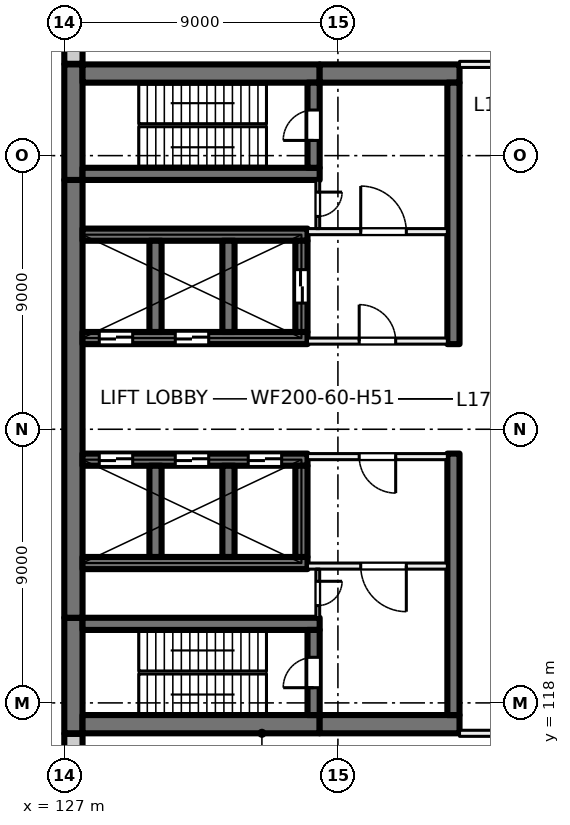
"""IFC4 building model, lengths in metres.
Left out: names, types, materials, properties, quantities, classifications, styles, units other than length and angle.
Written with IfcOpenShell. Run it as: python <this file> out.ifc"""

import sys

from ifc_helpers import new_model, si_unit, direction, frame, frame_2d, origin, place, context, subcontext, project, spatial, rectangle, extrude, element, fill, save


model = new_model("IFC4")
c1 = context("Model", 3, precision=1e-05, world=origin(), true_north=direction((0.0, 1.0)))
c2 = subcontext(c1, "Body", "Model", "MODEL_VIEW")
j1 = project(units=[si_unit("LENGTHUNIT", "METRE"), si_unit("PLANEANGLEUNIT", "RADIAN")], contexts=[c1])
p1 = place(None, origin())
s1 = spatial("IfcSite", under=j1, at=p1, CompositionType="ELEMENT")
p2 = place(p1, origin())
s2 = spatial("IfcBuilding", under=s1, at=p2, CompositionType="ELEMENT")
p3 = place(p2, frame((0.0, 0.0, 75.5)))
s3 = spatial("IfcBuildingStorey", under=s2, at=p3, CompositionType="ELEMENT", Elevation=75.5)
p4 = place(p3, frame((127.3, 117.0, 0.0), z_axis=(0.0, 0.0, 1.0), x_axis=(0.0, 1.0, 0.0)))
e1 = element("IfcWall", 1, at=p4, inside=s3, PredefinedType="SHEAR", context=c2, shape_type="SweptSolid", body=[
    extrude(rectangle(XDim=3.8, YDim=0.6, at=frame_2d((1.9, 0.0))), origin(), (0.0, 0.0, 1.0), 5.5),
])
p5 = place(p3, frame((127.3, 120.8, 0.0), z_axis=(0.0, 0.0, 1.0), x_axis=(0.0, 1.0, 0.0)))
e2 = element("IfcWall", 2, at=p5, inside=s3, PredefinedType="SHEAR", context=c2, shape_type="SweptSolid", body=[
    extrude(rectangle(XDim=14.4, YDim=0.6, at=frame_2d((7.2, 0.0))), origin(), (0.0, 0.0, 1.0), 5.5),
])
p6 = place(p3, frame((127.3, 135.2, 0.0), z_axis=(0.0, 0.0, 1.0), x_axis=(0.0, 1.0, 0.0)))
e3 = element("IfcWall", 3, at=p6, inside=s3, PredefinedType="SHEAR", context=c2, shape_type="SweptSolid", body=[
    extrude(rectangle(XDim=3.8, YDim=0.6, at=frame_2d((1.9, 0.0))), origin(), (0.0, 0.0, 1.0), 5.5),
])
for number, where, z_axis, x_axis in (
    (4, (127.6, 117.3, 0.0), (0.0, 0.0, 1.0), (1.0, 0.0, 0.0)),
    (5, (127.6, 138.7, 0.0), (0.0, 0.0, 1.0), (1.0, 0.0, 0.0)),
):
    element("IfcWall", number, at=place(p3, frame(where, z_axis=z_axis, x_axis=x_axis)), inside=s3, PredefinedType="SHEAR", context=c2, shape_type="SweptSolid", body=[
        extrude(rectangle(XDim=7.8, YDim=0.6, at=frame_2d((3.9, 0.0))), origin(), (0.0, 0.0, 1.0), 5.5),
    ])
for number, where, z_axis, x_axis in (
    (6, (135.4, 117.3, 0.0), (0.0, 0.0, 1.0), (1.0, 0.0, 0.0)),
    (7, (135.4, 138.7, 0.0), (0.0, 0.0, 1.0), (1.0, 0.0, 0.0)),
):
    element("IfcWall", number, at=place(p3, frame(where, z_axis=z_axis, x_axis=x_axis)), inside=s3, PredefinedType="SHEAR", context=c2, shape_type="SweptSolid", body=[
        extrude(rectangle(XDim=4.6, YDim=0.6, at=frame_2d((2.3, 0.0))), origin(), (0.0, 0.0, 1.0), 5.5),
    ])
p7 = place(p3, frame((127.6, 120.6, 0.0), z_axis=(0.0, 0.0, 1.0), x_axis=(1.0, 0.0, 0.0)))
e8 = element("IfcWall", 8, at=p7, inside=s3, PredefinedType="SHEAR", context=c2, shape_type="SweptSolid", body=[
    extrude(rectangle(XDim=7.8, YDim=0.4, at=frame_2d((3.9, 0.0))), origin(), (0.0, 0.0, 1.0), 5.5),
])
p8 = place(p3, frame((135.2, 117.6, 0.0), z_axis=(0.0, 0.0, 1.0), x_axis=(0.0, 1.0, 0.0)))
e9 = element("IfcWall", 9, at=p8, inside=s3, PredefinedType="SHEAR", context=c2, shape_type="SweptSolid", body=[
    extrude(rectangle(XDim=2.8, YDim=0.4, at=frame_2d((1.4, 0.0))), origin(), (0.0, 0.0, 1.0), 5.5),
])
p9 = place(p8, frame((0.9, 0.0, 0.0)))
e10 = element("IfcOpeningElement", 10, at=p9, cuts=e9, PredefinedType="OPENING", context=c2, shape_type="SweptSolid", body=[
    extrude(rectangle(XDim=1.0, YDim=2.1, at=frame_2d((0.5, 1.05))), frame((0.0, 0.21, 0.0), z_axis=(0.0, -1.0, 0.0), x_axis=(1.0, 0.0, 0.0)), (0.0, 0.0, 1.0), 0.42),
])
p10 = place(p3, frame((127.6, 135.4, 0.0), z_axis=(0.0, 0.0, 1.0), x_axis=(1.0, 0.0, 0.0)))
e11 = element("IfcWall", 11, at=p10, inside=s3, PredefinedType="SHEAR", context=c2, shape_type="SweptSolid", body=[
    extrude(rectangle(XDim=7.8, YDim=0.4, at=frame_2d((3.9, 0.0))), origin(), (0.0, 0.0, 1.0), 5.5),
])
p11 = place(p3, frame((135.2, 135.6, 0.0), z_axis=(0.0, 0.0, 1.0), x_axis=(0.0, 1.0, 0.0)))
e12 = element("IfcWall", 12, at=p11, inside=s3, PredefinedType="SHEAR", context=c2, shape_type="SweptSolid", body=[
    extrude(rectangle(XDim=2.8, YDim=0.4, at=frame_2d((1.4, 0.0))), origin(), (0.0, 0.0, 1.0), 5.5),
])
p12 = place(p11, frame((0.9, 0.0, 0.0)))
e13 = element("IfcOpeningElement", 13, at=p12, cuts=e12, PredefinedType="OPENING", context=c2, shape_type="SweptSolid", body=[
    extrude(rectangle(XDim=1.0, YDim=2.1, at=frame_2d((0.5, 1.05))), frame((0.0, 0.21, 0.0), z_axis=(0.0, -1.0, 0.0), x_axis=(1.0, 0.0, 0.0)), (0.0, 0.0, 1.0), 0.42),
])
p13 = place(p3, frame((127.6, 126.0, 0.0), z_axis=(0.0, 0.0, 1.0), x_axis=(1.0, 0.0, 0.0)))
e14 = element("IfcWall", 14, at=p13, inside=s3, PredefinedType="SHEAR", context=c2, shape_type="SweptSolid", body=[
    extrude(rectangle(XDim=7.4, YDim=0.4, at=frame_2d((3.7, 0.0))), origin(), (0.0, 0.0, 1.0), 5.5),
])
p14 = place(p13, frame((0.55, 0.0, 0.0)))
e15 = element("IfcOpeningElement", 15, at=p14, cuts=e14, PredefinedType="OPENING", context=c2, shape_type="SweptSolid", body=[
    extrude(rectangle(XDim=1.1, YDim=2.1, at=frame_2d((0.55, 1.05))), frame((0.0, 0.21, 0.0), z_axis=(0.0, -1.0, 0.0), x_axis=(1.0, 0.0, 0.0)), (0.0, 0.0, 1.0), 0.42),
])
p15 = place(p13, frame((3.05, 0.0, 0.0)))
e16 = element("IfcOpeningElement", 16, at=p15, cuts=e14, PredefinedType="OPENING", context=c2, shape_type="SweptSolid", body=[
    extrude(rectangle(XDim=1.1, YDim=2.1, at=frame_2d((0.55, 1.05))), frame((0.0, 0.21, 0.0), z_axis=(0.0, -1.0, 0.0), x_axis=(1.0, 0.0, 0.0)), (0.0, 0.0, 1.0), 0.42),
])
p16 = place(p13, frame((5.45, 0.0, 0.0)))
e17 = element("IfcOpeningElement", 17, at=p16, cuts=e14, PredefinedType="OPENING", context=c2, shape_type="SweptSolid", body=[
    extrude(rectangle(XDim=1.1, YDim=2.1, at=frame_2d((0.55, 1.05))), frame((0.0, 0.21, 0.0), z_axis=(0.0, -1.0, 0.0), x_axis=(1.0, 0.0, 0.0)), (0.0, 0.0, 1.0), 0.42),
])
p17 = place(p3, frame((127.6, 122.6, 0.0), z_axis=(0.0, 0.0, 1.0), x_axis=(1.0, 0.0, 0.0)))
e18 = element("IfcWall", 18, at=p17, inside=s3, PredefinedType="SHEAR", context=c2, shape_type="SweptSolid", body=[
    extrude(rectangle(XDim=7.4, YDim=0.4, at=frame_2d((3.7, 0.0))), origin(), (0.0, 0.0, 1.0), 5.5),
])
for number, where, z_axis, x_axis in (
    (19, (130.0, 122.8, 0.0), (0.0, 0.0, 1.0), (0.0, 1.0, 0.0)),
    (20, (132.4, 122.8, 0.0), (0.0, 0.0, 1.0), (0.0, 1.0, 0.0)),
    (21, (134.8, 122.8, 0.0), (0.0, 0.0, 1.0), (0.0, 1.0, 0.0)),
):
    element("IfcWall", number, at=place(p3, frame(where, z_axis=z_axis, x_axis=x_axis)), inside=s3, PredefinedType="SHEAR", context=c2, shape_type="SweptSolid", body=[
        extrude(rectangle(XDim=3.0, YDim=0.4, at=frame_2d((1.5, 0.0))), origin(), (0.0, 0.0, 1.0), 5.5),
    ])
p18 = place(p3, frame((127.6, 130.0, 0.0), z_axis=(0.0, 0.0, 1.0), x_axis=(1.0, 0.0, 0.0)))
e22 = element("IfcWall", 22, at=p18, inside=s3, PredefinedType="SHEAR", context=c2, shape_type="SweptSolid", body=[
    extrude(rectangle(XDim=7.4, YDim=0.4, at=frame_2d((3.7, 0.0))), origin(), (0.0, 0.0, 1.0), 5.5),
])
p19 = place(p18, frame((0.55, 0.0, 0.0)))
e23 = element("IfcOpeningElement", 23, at=p19, cuts=e22, PredefinedType="OPENING", context=c2, shape_type="SweptSolid", body=[
    extrude(rectangle(XDim=1.1, YDim=2.1, at=frame_2d((0.55, 1.05))), frame((0.0, 0.21, 0.0), z_axis=(0.0, -1.0, 0.0), x_axis=(1.0, 0.0, 0.0)), (0.0, 0.0, 1.0), 0.42),
])
p20 = place(p18, frame((3.05, 0.0, 0.0)))
e24 = element("IfcOpeningElement", 24, at=p20, cuts=e22, PredefinedType="OPENING", context=c2, shape_type="SweptSolid", body=[
    extrude(rectangle(XDim=1.1, YDim=2.1, at=frame_2d((0.55, 1.05))), frame((0.0, 0.21, 0.0), z_axis=(0.0, -1.0, 0.0), x_axis=(1.0, 0.0, 0.0)), (0.0, 0.0, 1.0), 0.42),
])
p21 = place(p3, frame((127.6, 133.4, 0.0), z_axis=(0.0, 0.0, 1.0), x_axis=(1.0, 0.0, 0.0)))
e25 = element("IfcWall", 25, at=p21, inside=s3, PredefinedType="SHEAR", context=c2, shape_type="SweptSolid", body=[
    extrude(rectangle(XDim=7.4, YDim=0.4, at=frame_2d((3.7, 0.0))), origin(), (0.0, 0.0, 1.0), 5.5),
])
for number, where, z_axis, x_axis in (
    (26, (130.0, 130.2, 0.0), (0.0, 0.0, 1.0), (0.0, 1.0, 0.0)),
    (27, (132.4, 130.2, 0.0), (0.0, 0.0, 1.0), (0.0, 1.0, 0.0)),
):
    element("IfcWall", number, at=place(p3, frame(where, z_axis=z_axis, x_axis=x_axis)), inside=s3, PredefinedType="SHEAR", context=c2, shape_type="SweptSolid", body=[
        extrude(rectangle(XDim=3.0, YDim=0.4, at=frame_2d((1.5, 0.0))), origin(), (0.0, 0.0, 1.0), 5.5),
    ])
p22 = place(p3, frame((134.8, 130.2, 0.0), z_axis=(0.0, 0.0, 1.0), x_axis=(0.0, 1.0, 0.0)))
e28 = element("IfcWall", 28, at=p22, inside=s3, PredefinedType="SHEAR", context=c2, shape_type="SweptSolid", body=[
    extrude(rectangle(XDim=3.0, YDim=0.4, at=frame_2d((1.5, 0.0))), origin(), (0.0, 0.0, 1.0), 5.5),
])
p23 = place(p22, frame((0.95, 0.0, 0.0)))
e29 = element("IfcOpeningElement", 29, at=p23, cuts=e28, PredefinedType="OPENING", context=c2, shape_type="SweptSolid", body=[
    extrude(rectangle(XDim=1.1, YDim=2.1, at=frame_2d((0.55, 1.05))), frame((0.0, 0.21, 0.0), z_axis=(0.0, -1.0, 0.0), x_axis=(1.0, 0.0, 0.0)), (0.0, 0.0, 1.0), 0.42),
])
for number, where, z_axis, x_axis in (
    (30, (139.8, 117.6, 0.0), (0.0, 0.0, 1.0), (0.0, 1.0, 0.0)),
    (31, (139.8, 129.8, 0.0), (0.0, 0.0, 1.0), (0.0, 1.0, 0.0)),
):
    element("IfcWall", number, at=place(p3, frame(where, z_axis=z_axis, x_axis=x_axis)), inside=s3, PredefinedType="SHEAR", context=c2, shape_type="SweptSolid", body=[
        extrude(rectangle(XDim=8.6, YDim=0.4, at=frame_2d((4.3, 0.0))), origin(), (0.0, 0.0, 1.0), 5.5),
    ])
p24 = place(p3, frame((127.3, 139.02, 0.0), z_axis=(0.0, 0.0, 1.0), x_axis=(0.0, 1.0, 0.0)))
e32 = element("IfcWall", 32, at=p24, inside=s3, PredefinedType="SOLIDWALL", context=c2, shape_type="SweptSolid", body=[
    extrude(rectangle(XDim=2.98, YDim=0.6, at=frame_2d((1.49, 0.0))), origin(), (0.0, 0.0, 1.0), 5.125),
])
p25 = place(p3, frame((127.3, 114.07, 0.0), z_axis=(0.0, 0.0, 1.0), x_axis=(0.0, 1.0, 0.0)))
e33 = element("IfcWall", 33, at=p25, inside=s3, PredefinedType="SOLIDWALL", context=c2, shape_type="SweptSolid", body=[
    extrude(rectangle(XDim=2.91, YDim=0.6, at=frame_2d((1.455, 0.0))), origin(), (0.0, 0.0, 1.0), 5.125),
])
p26 = place(p3, frame((135.0, 129.9, 0.0), z_axis=(0.0, 0.0, 1.0), x_axis=(1.0, 0.0, 0.0)))
e34 = element("IfcWall", 34, at=p26, inside=s3, PredefinedType="PARTITIONING", context=c2, shape_type="SweptSolid", body=[
    extrude(rectangle(XDim=4.6, YDim=0.2, at=frame_2d((2.3, 0.0))), origin(), (0.0, 0.0, 1.0), 5.125),
])
p27 = place(p26, frame((1.7, 0.0, 0.0)))
e35 = element("IfcOpeningElement", 35, at=p27, cuts=e34, PredefinedType="OPENING", context=c2, shape_type="SweptSolid", body=[
    extrude(rectangle(XDim=1.2, YDim=2.1, at=frame_2d((0.6, 1.05))), frame((0.0, 0.11, 0.0), z_axis=(0.0, -1.0, 0.0), x_axis=(1.0, 0.0, 0.0)), (0.0, 0.0, 1.0), 0.22),
])
p28 = place(p3, frame((135.0, 133.5, 0.0), z_axis=(0.0, 0.0, 1.0), x_axis=(1.0, 0.0, 0.0)))
e36 = element("IfcWall", 36, at=p28, inside=s3, PredefinedType="PARTITIONING", context=c2, shape_type="SweptSolid", body=[
    extrude(rectangle(XDim=4.6, YDim=0.2, at=frame_2d((2.3, 0.0))), origin(), (0.0, 0.0, 1.0), 5.125),
])
p29 = place(p28, frame((1.75, 0.0, 0.0)))
e37 = element("IfcOpeningElement", 37, at=p29, cuts=e36, PredefinedType="OPENING", context=c2, shape_type="SweptSolid", body=[
    extrude(rectangle(XDim=1.5, YDim=2.1, at=frame_2d((0.75, 1.05))), frame((0.0, 0.11, 0.0), z_axis=(0.0, -1.0, 0.0), x_axis=(1.0, 0.0, 0.0)), (0.0, 0.0, 1.0), 0.22),
])
p30 = place(p3, frame((135.337, 135.2, 0.0), z_axis=(0.0, 0.0, 1.0), x_axis=(0.0, -1.0, 0.0)))
e38 = element("IfcWall", 38, at=p30, inside=s3, PredefinedType="PARTITIONING", context=c2, shape_type="SweptSolid", body=[
    extrude(rectangle(XDim=1.6, YDim=0.125, at=frame_2d((0.8, 0.0))), origin(), (0.0, 0.0, 1.0), 5.125),
])
p31 = place(p30, frame((0.4, 0.0, 0.0)))
e39 = element("IfcOpeningElement", 39, at=p31, cuts=e38, PredefinedType="OPENING", context=c2, shape_type="SweptSolid", body=[
    extrude(rectangle(XDim=0.8, YDim=2.1, at=frame_2d((0.4, 1.05))), frame((0.0, 0.073, 0.0), z_axis=(0.0, -1.0, 0.0), x_axis=(1.0, 0.0, 0.0)), (0.0, 0.0, 1.0), 0.145),
])
p32 = place(p3, frame((139.6, 126.1, 0.0), z_axis=(0.0, 0.0, 1.0), x_axis=(-1.0, 0.0, 0.0)))
e40 = element("IfcWall", 40, at=p32, inside=s3, PredefinedType="PARTITIONING", context=c2, shape_type="SweptSolid", body=[
    extrude(rectangle(XDim=4.6, YDim=0.2, at=frame_2d((2.3, 0.0))), origin(), (0.0, 0.0, 1.0), 5.125),
])
p33 = place(p32, frame((1.7, 0.0, 0.0)))
e41 = element("IfcOpeningElement", 41, at=p33, cuts=e40, PredefinedType="OPENING", context=c2, shape_type="SweptSolid", body=[
    extrude(rectangle(XDim=1.2, YDim=2.1, at=frame_2d((0.6, 1.05))), frame((0.0, 0.11, 0.0), z_axis=(0.0, -1.0, 0.0), x_axis=(1.0, 0.0, 0.0)), (0.0, 0.0, 1.0), 0.22),
])
p34 = place(p3, frame((139.6, 122.5, 0.0), z_axis=(0.0, 0.0, 1.0), x_axis=(-1.0, 0.0, 0.0)))
e42 = element("IfcWall", 42, at=p34, inside=s3, PredefinedType="PARTITIONING", context=c2, shape_type="SweptSolid", body=[
    extrude(rectangle(XDim=4.6, YDim=0.2, at=frame_2d((2.3, 0.0))), origin(), (0.0, 0.0, 1.0), 5.125),
])
p35 = place(p34, frame((1.35, 0.0, 0.0)))
e43 = element("IfcOpeningElement", 43, at=p35, cuts=e42, PredefinedType="OPENING", context=c2, shape_type="SweptSolid", body=[
    extrude(rectangle(XDim=1.5, YDim=2.1, at=frame_2d((0.75, 1.05))), frame((0.0, 0.11, 0.0), z_axis=(0.0, -1.0, 0.0), x_axis=(1.0, 0.0, 0.0)), (0.0, 0.0, 1.0), 0.22),
])
p36 = place(p3, frame((135.337, 122.4, 0.0), z_axis=(0.0, 0.0, 1.0), x_axis=(0.0, -1.0, 0.0)))
e44 = element("IfcWall", 44, at=p36, inside=s3, PredefinedType="PARTITIONING", context=c2, shape_type="SweptSolid", body=[
    extrude(rectangle(XDim=1.6, YDim=0.125, at=frame_2d((0.8, 0.0))), origin(), (0.0, 0.0, 1.0), 5.125),
])
p37 = place(p36, frame((0.4, 0.0, 0.0)))
e45 = element("IfcOpeningElement", 45, at=p37, cuts=e44, PredefinedType="OPENING", context=c2, shape_type="SweptSolid", body=[
    extrude(rectangle(XDim=0.8, YDim=2.1, at=frame_2d((0.4, 1.05))), frame((0.0, 0.073, 0.0), z_axis=(0.0, -1.0, 0.0), x_axis=(1.0, 0.0, 0.0)), (0.0, 0.0, 1.0), 0.145),
])
p38 = place(p3, frame((154.0, 117.0, 0.0), z_axis=(0.0, 0.0, 1.0), x_axis=(-1.0, 0.0, 0.0)))
e46 = element("IfcWall", 46, at=p38, inside=s3, PredefinedType="PARTITIONING", context=c2, shape_type="SweptSolid", body=[
    extrude(rectangle(XDim=14.0, YDim=0.2, at=frame_2d((7.0, 0.0))), origin(), (0.0, 0.0, 1.0), 5.125),
])
p39 = place(p38, frame((11.1, 0.0, 0.0)))
e47 = element("IfcOpeningElement", 47, at=p39, cuts=e46, PredefinedType="OPENING", context=c2, shape_type="SweptSolid", body=[
    extrude(rectangle(XDim=1.8, YDim=2.1, at=frame_2d((0.9, 1.05))), frame((0.0, 0.11, 0.0), z_axis=(0.0, -1.0, 0.0), x_axis=(1.0, 0.0, 0.0)), (0.0, 0.0, 1.0), 0.22),
])
p40 = place(p38, frame((1.1, 0.0, 0.0)))
e48 = element("IfcOpeningElement", 48, at=p40, cuts=e46, PredefinedType="OPENING", context=c2, shape_type="SweptSolid", body=[
    extrude(rectangle(XDim=1.8, YDim=2.1, at=frame_2d((0.9, 1.05))), frame((0.0, 0.11, 0.0), z_axis=(0.0, -1.0, 0.0), x_axis=(1.0, 0.0, 0.0)), (0.0, 0.0, 1.0), 0.22),
])
p41 = place(p3, frame((140.0, 139.0, 0.0), z_axis=(0.0, 0.0, 1.0), x_axis=(1.0, 0.0, 0.0)))
e49 = element("IfcWall", 49, at=p41, inside=s3, PredefinedType="PARTITIONING", context=c2, shape_type="SweptSolid", body=[
    extrude(rectangle(XDim=4.0, YDim=0.2, at=frame_2d((2.0, 0.0))), origin(), (0.0, 0.0, 1.0), 5.125),
])
p42 = place(p41, frame((1.1, 0.0, 0.0)))
e50 = element("IfcOpeningElement", 50, at=p42, cuts=e49, PredefinedType="OPENING", context=c2, shape_type="SweptSolid", body=[
    extrude(rectangle(XDim=1.8, YDim=2.1, at=frame_2d((0.9, 1.05))), frame((0.0, 0.11, 0.0), z_axis=(0.0, -1.0, 0.0), x_axis=(1.0, 0.0, 0.0)), (0.0, 0.0, 1.0), 0.22),
])
p43 = place(p19, origin())
e51 = element("IfcDoor", 51, at=p43, inside=s3, OperationType="DOUBLE_DOOR_SLIDING", PredefinedType="DOOR", context=c2, shape_type="SweptSolid", body=[
    extrude(rectangle(XDim=1.1, YDim=2.1, at=frame_2d((0.55, 1.05))), frame((0.0, 0.025, 0.0), z_axis=(0.0, -1.0, 0.0), x_axis=(1.0, 0.0, 0.0)), (0.0, 0.0, 1.0), 0.05),
])
fill(e23, e51)
p44 = place(p20, origin())
e52 = element("IfcDoor", 52, at=p44, inside=s3, OperationType="DOUBLE_DOOR_SLIDING", PredefinedType="DOOR", context=c2, shape_type="SweptSolid", body=[
    extrude(rectangle(XDim=1.1, YDim=2.1, at=frame_2d((0.55, 1.05))), frame((0.0, 0.025, 0.0), z_axis=(0.0, -1.0, 0.0), x_axis=(1.0, 0.0, 0.0)), (0.0, 0.0, 1.0), 0.05),
])
fill(e24, e52)
p45 = place(p14, origin())
e53 = element("IfcDoor", 53, at=p45, inside=s3, OperationType="DOUBLE_DOOR_SLIDING", PredefinedType="DOOR", context=c2, shape_type="SweptSolid", body=[
    extrude(rectangle(XDim=1.1, YDim=2.1, at=frame_2d((0.55, 1.05))), frame((0.0, 0.025, 0.0), z_axis=(0.0, -1.0, 0.0), x_axis=(1.0, 0.0, 0.0)), (0.0, 0.0, 1.0), 0.05),
])
fill(e15, e53)
p46 = place(p15, origin())
e54 = element("IfcDoor", 54, at=p46, inside=s3, OperationType="DOUBLE_DOOR_SLIDING", PredefinedType="DOOR", context=c2, shape_type="SweptSolid", body=[
    extrude(rectangle(XDim=1.1, YDim=2.1, at=frame_2d((0.55, 1.05))), frame((0.0, 0.025, 0.0), z_axis=(0.0, -1.0, 0.0), x_axis=(1.0, 0.0, 0.0)), (0.0, 0.0, 1.0), 0.05),
])
fill(e16, e54)
p47 = place(p16, origin())
e55 = element("IfcDoor", 55, at=p47, inside=s3, OperationType="DOUBLE_DOOR_SLIDING", PredefinedType="DOOR", context=c2, shape_type="SweptSolid", body=[
    extrude(rectangle(XDim=1.1, YDim=2.1, at=frame_2d((0.55, 1.05))), frame((0.0, 0.025, 0.0), z_axis=(0.0, -1.0, 0.0), x_axis=(1.0, 0.0, 0.0)), (0.0, 0.0, 1.0), 0.05),
])
fill(e17, e55)
p48 = place(p27, origin())
e56 = element("IfcDoor", 56, at=p48, inside=s3, OperationType="DOUBLE_DOOR_SINGLE_SWING", PredefinedType="DOOR", context=c2, shape_type="SweptSolid", body=[
    extrude(rectangle(XDim=1.2, YDim=2.1, at=frame_2d((0.6, 1.05))), frame((0.0, 0.025, 0.0), z_axis=(0.0, -1.0, 0.0), x_axis=(1.0, 0.0, 0.0)), (0.0, 0.0, 1.0), 0.05),
])
fill(e35, e56)
p49 = place(p29, origin())
e57 = element("IfcDoor", 57, at=p49, inside=s3, OperationType="DOUBLE_DOOR_SINGLE_SWING", PredefinedType="DOOR", context=c2, shape_type="SweptSolid", body=[
    extrude(rectangle(XDim=1.5, YDim=2.1, at=frame_2d((0.75, 1.05))), frame((0.0, 0.025, 0.0), z_axis=(0.0, -1.0, 0.0), x_axis=(1.0, 0.0, 0.0)), (0.0, 0.0, 1.0), 0.05),
])
fill(e37, e57)
p50 = place(p12, origin())
e58 = element("IfcDoor", 58, at=p50, inside=s3, OperationType="SINGLE_SWING_LEFT", PredefinedType="DOOR", context=c2, shape_type="SweptSolid", body=[
    extrude(rectangle(XDim=1.0, YDim=2.1, at=frame_2d((0.5, 1.05))), frame((0.0, 0.025, 0.0), z_axis=(0.0, -1.0, 0.0), x_axis=(1.0, 0.0, 0.0)), (0.0, 0.0, 1.0), 0.05),
])
fill(e13, e58)
p51 = place(p31, origin())
e59 = element("IfcDoor", 59, at=p51, inside=s3, OperationType="SINGLE_SWING_RIGHT", PredefinedType="DOOR", context=c2, shape_type="SweptSolid", body=[
    extrude(rectangle(XDim=0.8, YDim=2.1, at=frame_2d((0.4, 1.05))), frame((0.0, 0.025, 0.0), z_axis=(0.0, -1.0, 0.0), x_axis=(1.0, 0.0, 0.0)), (0.0, 0.0, 1.0), 0.05),
])
fill(e39, e59)
p52 = place(p33, origin())
e60 = element("IfcDoor", 60, at=p52, inside=s3, OperationType="DOUBLE_DOOR_SINGLE_SWING", PredefinedType="DOOR", context=c2, shape_type="SweptSolid", body=[
    extrude(rectangle(XDim=1.2, YDim=2.1, at=frame_2d((0.6, 1.05))), frame((0.0, 0.025, 0.0), z_axis=(0.0, -1.0, 0.0), x_axis=(1.0, 0.0, 0.0)), (0.0, 0.0, 1.0), 0.05),
])
fill(e41, e60)
p53 = place(p35, origin())
e61 = element("IfcDoor", 61, at=p53, inside=s3, OperationType="DOUBLE_DOOR_SINGLE_SWING", PredefinedType="DOOR", context=c2, shape_type="SweptSolid", body=[
    extrude(rectangle(XDim=1.5, YDim=2.1, at=frame_2d((0.75, 1.05))), frame((0.0, 0.025, 0.0), z_axis=(0.0, -1.0, 0.0), x_axis=(1.0, 0.0, 0.0)), (0.0, 0.0, 1.0), 0.05),
])
fill(e43, e61)
p54 = place(p9, origin())
e62 = element("IfcDoor", 62, at=p54, inside=s3, OperationType="SINGLE_SWING_RIGHT", PredefinedType="DOOR", context=c2, shape_type="SweptSolid", body=[
    extrude(rectangle(XDim=1.0, YDim=2.1, at=frame_2d((0.5, 1.05))), frame((0.0, 0.025, 0.0), z_axis=(0.0, -1.0, 0.0), x_axis=(1.0, 0.0, 0.0)), (0.0, 0.0, 1.0), 0.05),
])
fill(e10, e62)
p55 = place(p37, origin())
e63 = element("IfcDoor", 63, at=p55, inside=s3, OperationType="SINGLE_SWING_LEFT", PredefinedType="DOOR", context=c2, shape_type="SweptSolid", body=[
    extrude(rectangle(XDim=0.8, YDim=2.1, at=frame_2d((0.4, 1.05))), frame((0.0, 0.025, 0.0), z_axis=(0.0, -1.0, 0.0), x_axis=(1.0, 0.0, 0.0)), (0.0, 0.0, 1.0), 0.05),
])
fill(e45, e63)
p56 = place(p23, origin())
e64 = element("IfcDoor", 64, at=p56, inside=s3, OperationType="DOUBLE_DOOR_SLIDING", PredefinedType="DOOR", context=c2, shape_type="SweptSolid", body=[
    extrude(rectangle(XDim=1.1, YDim=2.1, at=frame_2d((0.55, 1.05))), frame((0.0, 0.025, 0.0), z_axis=(0.0, -1.0, 0.0), x_axis=(1.0, 0.0, 0.0)), (0.0, 0.0, 1.0), 0.05),
])
fill(e29, e64)
save(model, sys.argv[1])
